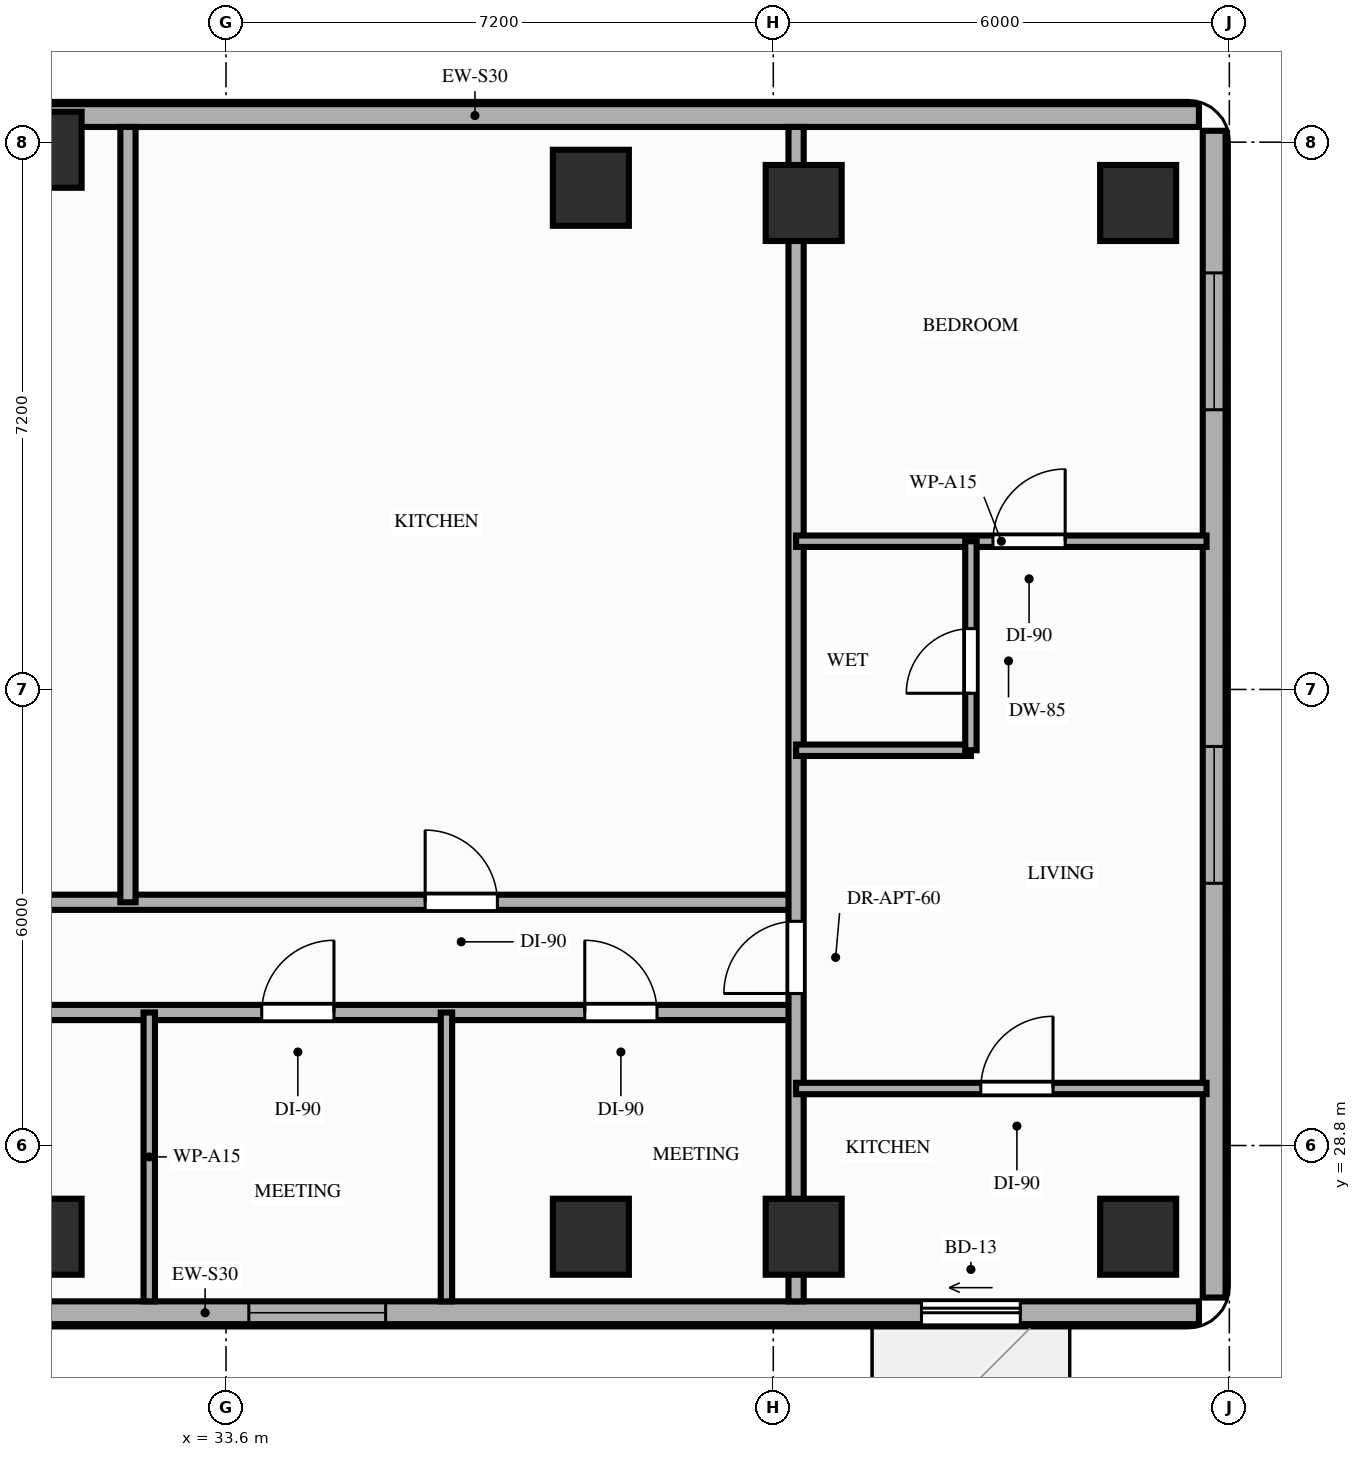
"""IFC4 building model, lengths in metres.
Left out: names, types, materials, properties, quantities, classifications, styles, units other than length and angle.
Written with IfcOpenShell. Run it as: python <this file> out.ifc"""

import sys

from ifc_helpers import new_model, si_unit, direction, frame, frame_2d, origin, origin_2d, place, context, subcontext, project, spatial, rectangle, extrude, element, fill, save


model = new_model("IFC4")
c1 = context("Model", 3, precision=1e-05, world=origin(), true_north=direction((0.0, 1.0)))
c2 = subcontext(c1, "Body", "Model", "MODEL_VIEW")
j1 = project(units=[si_unit("LENGTHUNIT", "METRE"), si_unit("PLANEANGLEUNIT", "RADIAN")], contexts=[c1])
p1 = place(None, origin())
s1 = spatial("IfcSite", under=j1, at=p1, CompositionType="ELEMENT")
p2 = place(p1, origin())
s2 = spatial("IfcBuilding", under=s1, at=p2, CompositionType="ELEMENT")
p3 = place(p2, frame((0.0, 0.0, 149.0)))
s3 = spatial("IfcBuildingStorey", under=s2, at=p3, CompositionType="ELEMENT", Elevation=149.0)
for number, where, z_axis, x_axis in (
    (1, (31.2, 27.6, 0.0), (0.0, 0.0, 1.0), (1.0, 0.0, 0.0)),
    (2, (31.2, 41.9, 0.0), (0.0, 0.0, 1.0), (1.0, 0.0, 0.0)),
    (3, (38.4, 27.6, 0.0), (0.0, 0.0, 1.0), (1.0, 0.0, 0.0)),
    (4, (38.4, 41.4, 0.0), (0.0, 0.0, 1.0), (1.0, 0.0, 0.0)),
    (5, (41.2, 27.6, 0.0), (0.0, 0.0, 1.0), (1.0, 0.0, 0.0)),
    (6, (41.2, 41.2, 0.0), (0.0, 0.0, 1.0), (1.0, 0.0, 0.0)),
    (7, (45.6, 27.6, 0.0), (0.0, 0.0, 1.0), (1.0, 0.0, 0.0)),
    (8, (45.6, 41.2, 0.0), (0.0, 0.0, 1.0), (1.0, 0.0, 0.0)),
):
    element("IfcColumn", number, at=place(p3, frame(where, z_axis=z_axis, x_axis=x_axis)), inside=s3, PredefinedType="COLUMN", context=c2, shape_type="SweptSolid", body=[
        extrude(rectangle(XDim=1.0, YDim=1.0, at=origin_2d()), origin(), (0.0, 0.0, 1.0), 3.2),
    ])
p4 = place(p3, frame((46.4, 42.35, 0.0), z_axis=(0.0, 0.0, 1.0), x_axis=(-1.0, 0.0, 0.0)))
e9 = element("IfcWall", 9, at=p4, inside=s3, PredefinedType="STANDARD", context=c2, shape_type="SweptSolid", body=[
    extrude(rectangle(XDim=19.05, YDim=0.3, at=frame_2d((9.525, 0.0))), origin(), (0.0, 0.0, 1.0), 2.4),
])
p5 = place(p3, frame((20.25, 26.6, 0.0), z_axis=(0.0, 0.0, 1.0), x_axis=(1.0, 0.0, 0.0)))
e10 = element("IfcWall", 10, at=p5, inside=s3, PredefinedType="STANDARD", context=c2, shape_type="SweptSolid", body=[
    extrude(rectangle(XDim=26.15, YDim=0.3, at=frame_2d((13.075, 0.0))), origin(), (0.0, 0.0, 1.0), 2.67),
])
p6 = place(p5, frame((8.0, 0.0, 0.0)))
e11 = element("IfcOpeningElement", 11, at=p6, cuts=e10, PredefinedType="OPENING", context=c2, shape_type="SweptSolid", body=[
    extrude(rectangle(XDim=1.3, YDim=2.08, at=frame_2d((0.65, 1.04))), frame((0.0, 0.16, 0.0), z_axis=(0.0, -1.0, 0.0), x_axis=(1.0, 0.0, 0.0)), (0.0, 0.0, 1.0), 0.32),
])
p7 = place(p5, frame((22.5, 0.0, 0.0)))
e12 = element("IfcOpeningElement", 12, at=p7, cuts=e10, PredefinedType="OPENING", context=c2, shape_type="SweptSolid", body=[
    extrude(rectangle(XDim=1.3, YDim=2.08, at=frame_2d((0.65, 1.04))), frame((0.0, 0.16, 0.0), z_axis=(0.0, -1.0, 0.0), x_axis=(1.0, 0.0, 0.0)), (0.0, 0.0, 1.0), 0.32),
])
p8 = place(p5, frame((2.25, 0.0, 0.85)))
e13 = element("IfcOpeningElement", 13, at=p8, cuts=e10, PredefinedType="OPENING", context=c2, shape_type="SweptSolid", body=[
    extrude(rectangle(XDim=1.8, YDim=1.57, at=frame_2d((0.9, 0.785))), frame((0.0, 0.16, 0.0), z_axis=(0.0, -1.0, 0.0), x_axis=(1.0, 0.0, 0.0)), (0.0, 0.0, 1.0), 0.32),
])
p9 = place(p5, frame((13.65, 0.0, 0.85)))
e14 = element("IfcOpeningElement", 14, at=p9, cuts=e10, PredefinedType="OPENING", context=c2, shape_type="SweptSolid", body=[
    extrude(rectangle(XDim=1.8, YDim=1.57, at=frame_2d((0.9, 0.785))), frame((0.0, 0.16, 0.0), z_axis=(0.0, -1.0, 0.0), x_axis=(1.0, 0.0, 0.0)), (0.0, 0.0, 1.0), 0.32),
])
p10 = place(p3, frame((46.6, 26.8, 0.0), z_axis=(0.0, 0.0, 1.0), x_axis=(0.0, 1.0, 0.0)))
e15 = element("IfcWall", 15, at=p10, inside=s3, PredefinedType="STANDARD", context=c2, shape_type="SweptSolid", body=[
    extrude(rectangle(XDim=15.35, YDim=0.3, at=frame_2d((7.675, 0.0))), origin(), (0.0, 0.0, 1.0), 2.96),
])
p11 = place(p10, frame((5.45, 0.0, 0.85)))
e16 = element("IfcOpeningElement", 16, at=p11, cuts=e15, PredefinedType="OPENING", context=c2, shape_type="SweptSolid", body=[
    extrude(rectangle(XDim=1.8, YDim=1.75, at=frame_2d((0.9, 0.875))), frame((0.0, 0.16, 0.0), z_axis=(0.0, -1.0, 0.0), x_axis=(1.0, 0.0, 0.0)), (0.0, 0.0, 1.0), 0.32),
])
p12 = place(p10, frame((11.68, 0.0, 0.85)))
e17 = element("IfcOpeningElement", 17, at=p12, cuts=e15, PredefinedType="OPENING", context=c2, shape_type="SweptSolid", body=[
    extrude(rectangle(XDim=1.8, YDim=1.75, at=frame_2d((0.9, 0.875))), frame((0.0, 0.16, 0.0), z_axis=(0.0, -1.0, 0.0), x_axis=(1.0, 0.0, 0.0)), (0.0, 0.0, 1.0), 0.32),
])
p13 = place(p3, frame((27.15, 30.55, 0.0), z_axis=(0.0, 0.0, 1.0), x_axis=(1.0, 0.0, 0.0)))
e18 = element("IfcWall", 18, at=p13, inside=s3, PredefinedType="PARTITIONING", context=c2, shape_type="SweptSolid", body=[
    extrude(rectangle(XDim=13.95, YDim=0.2, at=frame_2d((6.975, 0.0))), origin(), (0.0, 0.0, 1.0), 2.4),
])
p14 = place(p13, frame((2.24, 0.0, 0.0)))
e19 = element("IfcOpeningElement", 19, at=p14, cuts=e18, PredefinedType="OPENING", context=c2, shape_type="SweptSolid", body=[
    extrude(rectangle(XDim=0.95, YDim=2.15, at=frame_2d((0.475, 1.075))), frame((0.0, 0.11, 0.0), z_axis=(0.0, -1.0, 0.0), x_axis=(1.0, 0.0, 0.0)), (0.0, 0.0, 1.0), 0.22),
])
p15 = place(p13, frame((6.92, 0.0, 0.0)))
e20 = element("IfcOpeningElement", 20, at=p15, cuts=e18, PredefinedType="OPENING", context=c2, shape_type="SweptSolid", body=[
    extrude(rectangle(XDim=0.95, YDim=2.15, at=frame_2d((0.475, 1.075))), frame((0.0, 0.11, 0.0), z_axis=(0.0, -1.0, 0.0), x_axis=(1.0, 0.0, 0.0)), (0.0, 0.0, 1.0), 0.22),
])
p16 = place(p13, frame((11.17, 0.0, 0.0)))
e21 = element("IfcOpeningElement", 21, at=p16, cuts=e18, PredefinedType="OPENING", context=c2, shape_type="SweptSolid", body=[
    extrude(rectangle(XDim=0.95, YDim=2.15, at=frame_2d((0.475, 1.075))), frame((0.0, 0.11, 0.0), z_axis=(0.0, -1.0, 0.0), x_axis=(1.0, 0.0, 0.0)), (0.0, 0.0, 1.0), 0.22),
])
p17 = place(p3, frame((27.15, 32.0, 0.0), z_axis=(0.0, 0.0, 1.0), x_axis=(1.0, 0.0, 0.0)))
e22 = element("IfcWall", 22, at=p17, inside=s3, PredefinedType="PARTITIONING", context=c2, shape_type="SweptSolid", body=[
    extrude(rectangle(XDim=13.95, YDim=0.2, at=frame_2d((6.975, 0.0))), origin(), (0.0, 0.0, 1.0), 2.4),
])
p18 = place(p17, frame((2.1, 0.0, 0.0)))
e23 = element("IfcOpeningElement", 23, at=p18, cuts=e22, PredefinedType="OPENING", context=c2, shape_type="SweptSolid", body=[
    extrude(rectangle(XDim=0.95, YDim=2.15, at=frame_2d((0.475, 1.075))), frame((0.0, 0.11, 0.0), z_axis=(0.0, -1.0, 0.0), x_axis=(1.0, 0.0, 0.0)), (0.0, 0.0, 1.0), 0.22),
])
p19 = place(p17, frame((9.07, 0.0, 0.0)))
e24 = element("IfcOpeningElement", 24, at=p19, cuts=e22, PredefinedType="OPENING", context=c2, shape_type="SweptSolid", body=[
    extrude(rectangle(XDim=0.95, YDim=2.15, at=frame_2d((0.475, 1.075))), frame((0.0, 0.11, 0.0), z_axis=(0.0, -1.0, 0.0), x_axis=(1.0, 0.0, 0.0)), (0.0, 0.0, 1.0), 0.22),
])
p20 = place(p3, frame((41.1, 26.75, 0.0), z_axis=(0.0, 0.0, 1.0), x_axis=(0.0, 1.0, 0.0)))
e25 = element("IfcWall", 25, at=p20, inside=s3, PredefinedType="PARTITIONING", context=c2, shape_type="SweptSolid", body=[
    extrude(rectangle(XDim=15.45, YDim=0.2, at=frame_2d((7.725, 0.0))), origin(), (0.0, 0.0, 1.0), 2.4),
])
p21 = place(p20, frame((4.05, 0.0, 0.0)))
e26 = element("IfcOpeningElement", 26, at=p21, cuts=e25, PredefinedType="OPENING", context=c2, shape_type="SweptSolid", body=[
    extrude(rectangle(XDim=0.95, YDim=2.15, at=frame_2d((0.475, 1.075))), frame((0.0, 0.11, 0.0), z_axis=(0.0, -1.0, 0.0), x_axis=(1.0, 0.0, 0.0)), (0.0, 0.0, 1.0), 0.22),
])
p22 = place(p3, frame((41.1, 29.55, 0.0), z_axis=(0.0, 0.0, 1.0), x_axis=(1.0, 0.0, 0.0)))
e27 = element("IfcWall", 27, at=p22, inside=s3, PredefinedType="PARTITIONING", context=c2, shape_type="SweptSolid", body=[
    extrude(rectangle(XDim=5.4, YDim=0.15, at=frame_2d((2.7, 0.0))), origin(), (0.0, 0.0, 1.0), 2.4),
])
p23 = place(p22, frame((2.43, 0.0, 0.0)))
e28 = element("IfcOpeningElement", 28, at=p23, cuts=e27, PredefinedType="OPENING", context=c2, shape_type="SweptSolid", body=[
    extrude(rectangle(XDim=0.95, YDim=2.15, at=frame_2d((0.475, 1.075))), frame((0.0, 0.085, 0.0), z_axis=(0.0, -1.0, 0.0), x_axis=(1.0, 0.0, 0.0)), (0.0, 0.0, 1.0), 0.17),
])
p24 = place(p3, frame((41.1, 36.75, 0.0), z_axis=(0.0, 0.0, 1.0), x_axis=(1.0, 0.0, 0.0)))
e29 = element("IfcWall", 29, at=p24, inside=s3, PredefinedType="PARTITIONING", context=c2, shape_type="SweptSolid", body=[
    extrude(rectangle(XDim=5.4, YDim=0.15, at=frame_2d((2.7, 0.0))), origin(), (0.0, 0.0, 1.0), 2.4),
])
p25 = place(p24, frame((2.59, 0.0, 0.0)))
e30 = element("IfcOpeningElement", 30, at=p25, cuts=e29, PredefinedType="OPENING", context=c2, shape_type="SweptSolid", body=[
    extrude(rectangle(XDim=0.95, YDim=2.15, at=frame_2d((0.475, 1.075))), frame((0.0, 0.085, 0.0), z_axis=(0.0, -1.0, 0.0), x_axis=(1.0, 0.0, 0.0)), (0.0, 0.0, 1.0), 0.17),
])
p26 = place(p3, frame((41.1, 34.0, 0.0), z_axis=(0.0, 0.0, 1.0), x_axis=(1.0, 0.0, 0.0)))
e31 = element("IfcWall", 31, at=p26, inside=s3, PredefinedType="PARTITIONING", context=c2, shape_type="SweptSolid", body=[
    extrude(rectangle(XDim=2.3, YDim=0.15, at=frame_2d((1.15, 0.0))), origin(), (0.0, 0.0, 1.0), 2.4),
])
p27 = place(p3, frame((43.4, 34.0, 0.0), z_axis=(0.0, 0.0, 1.0), x_axis=(0.0, 1.0, 0.0)))
e32 = element("IfcWall", 32, at=p27, inside=s3, PredefinedType="PARTITIONING", context=c2, shape_type="SweptSolid", body=[
    extrude(rectangle(XDim=2.75, YDim=0.15, at=frame_2d((1.375, 0.0))), origin(), (0.0, 0.0, 1.0), 2.55),
])
p28 = place(p27, frame((0.75, 0.0, 0.0)))
e33 = element("IfcOpeningElement", 33, at=p28, cuts=e32, PredefinedType="OPENING", context=c2, shape_type="SweptSolid", body=[
    extrude(rectangle(XDim=0.85, YDim=2.1, at=frame_2d((0.425, 1.05))), frame((0.0, 0.085, 0.0), z_axis=(0.0, -1.0, 0.0), x_axis=(1.0, 0.0, 0.0)), (0.0, 0.0, 1.0), 0.17),
])
for number, where, z_axis, x_axis in (
    (34, (32.59, 26.75, 0.0), (0.0, 0.0, 1.0), (0.0, 1.0, 0.0)),
    (35, (36.5, 26.75, 0.0), (0.0, 0.0, 1.0), (0.0, 1.0, 0.0)),
):
    element("IfcWall", number, at=place(p3, frame(where, z_axis=z_axis, x_axis=x_axis)), inside=s3, PredefinedType="PARTITIONING", context=c2, shape_type="SweptSolid", body=[
        extrude(rectangle(XDim=3.8, YDim=0.15, at=frame_2d((1.9, 0.0))), origin(), (0.0, 0.0, 1.0), 2.4),
    ])
p29 = place(p3, frame((32.31, 32.0, 0.0), z_axis=(0.0, 0.0, 1.0), x_axis=(0.0, 1.0, 0.0)))
e36 = element("IfcWall", 36, at=p29, inside=s3, PredefinedType="PARTITIONING", context=c2, shape_type="SweptSolid", body=[
    extrude(rectangle(XDim=10.2, YDim=0.2, at=frame_2d((5.1, 0.0))), origin(), (0.0, 0.0, 1.0), 2.4),
])
p30 = place(p7, origin())
e37 = element("IfcDoor", 37, at=p30, inside=s3, OperationType="SLIDING_TO_LEFT", PredefinedType="DOOR", context=c2, shape_type="SweptSolid", body=[
    extrude(rectangle(XDim=1.3, YDim=2.08, at=frame_2d((0.65, 1.04))), frame((0.0, 0.025, 0.0), z_axis=(0.0, -1.0, 0.0), x_axis=(1.0, 0.0, 0.0)), (0.0, 0.0, 1.0), 0.05),
])
fill(e12, e37)
p31 = place(p11, origin())
e38 = element("IfcWindow", 38, at=p31, inside=s3, PartitioningType="SINGLE_PANEL", PredefinedType="WINDOW", context=c2, shape_type="SweptSolid", body=[
    extrude(rectangle(XDim=1.8, YDim=1.75, at=frame_2d((0.9, 0.875))), frame((0.0, 0.03, 0.0), z_axis=(0.0, -1.0, 0.0), x_axis=(1.0, 0.0, 0.0)), (0.0, 0.0, 1.0), 0.06),
])
fill(e16, e38)
p32 = place(p12, origin())
e39 = element("IfcWindow", 39, at=p32, inside=s3, PartitioningType="SINGLE_PANEL", PredefinedType="WINDOW", context=c2, shape_type="SweptSolid", body=[
    extrude(rectangle(XDim=1.8, YDim=1.75, at=frame_2d((0.9, 0.875))), frame((0.0, 0.03, 0.0), z_axis=(0.0, -1.0, 0.0), x_axis=(1.0, 0.0, 0.0)), (0.0, 0.0, 1.0), 0.06),
])
fill(e17, e39)
p33 = place(p9, origin())
e40 = element("IfcWindow", 40, at=p33, inside=s3, PartitioningType="SINGLE_PANEL", PredefinedType="WINDOW", context=c2, shape_type="SweptSolid", body=[
    extrude(rectangle(XDim=1.8, YDim=1.57, at=frame_2d((0.9, 0.785))), frame((0.0, 0.03, 0.0), z_axis=(0.0, -1.0, 0.0), x_axis=(1.0, 0.0, 0.0)), (0.0, 0.0, 1.0), 0.06),
])
fill(e14, e40)
p34 = place(p21, origin())
e41 = element("IfcDoor", 41, at=p34, inside=s3, OperationType="SINGLE_SWING_LEFT", PredefinedType="DOOR", context=c2, shape_type="SweptSolid", body=[
    extrude(rectangle(XDim=0.95, YDim=2.15, at=frame_2d((0.475, 1.075))), frame((0.0, 0.025, 0.0), z_axis=(0.0, -1.0, 0.0), x_axis=(1.0, 0.0, 0.0)), (0.0, 0.0, 1.0), 0.05),
])
fill(e26, e41)
p35 = place(p25, origin())
e42 = element("IfcDoor", 42, at=p35, inside=s3, OperationType="SINGLE_SWING_RIGHT", PredefinedType="DOOR", context=c2, shape_type="SweptSolid", body=[
    extrude(rectangle(XDim=0.95, YDim=2.15, at=frame_2d((0.475, 1.075))), frame((0.0, 0.025, 0.0), z_axis=(0.0, -1.0, 0.0), x_axis=(1.0, 0.0, 0.0)), (0.0, 0.0, 1.0), 0.05),
])
fill(e30, e42)
p36 = place(p28, origin())
e43 = element("IfcDoor", 43, at=p36, inside=s3, OperationType="SINGLE_SWING_LEFT", PredefinedType="DOOR", context=c2, shape_type="SweptSolid", body=[
    extrude(rectangle(XDim=0.85, YDim=2.1, at=frame_2d((0.425, 1.05))), frame((0.0, 0.025, 0.0), z_axis=(0.0, -1.0, 0.0), x_axis=(1.0, 0.0, 0.0)), (0.0, 0.0, 1.0), 0.05),
])
fill(e33, e43)
p37 = place(p23, origin())
e44 = element("IfcDoor", 44, at=p37, inside=s3, OperationType="SINGLE_SWING_RIGHT", PredefinedType="DOOR", context=c2, shape_type="SweptSolid", body=[
    extrude(rectangle(XDim=0.95, YDim=2.15, at=frame_2d((0.475, 1.075))), frame((0.0, 0.025, 0.0), z_axis=(0.0, -1.0, 0.0), x_axis=(1.0, 0.0, 0.0)), (0.0, 0.0, 1.0), 0.05),
])
fill(e28, e44)
p38 = place(p15, origin())
e45 = element("IfcDoor", 45, at=p38, inside=s3, OperationType="SINGLE_SWING_RIGHT", PredefinedType="DOOR", context=c2, shape_type="SweptSolid", body=[
    extrude(rectangle(XDim=0.95, YDim=2.15, at=frame_2d((0.475, 1.075))), frame((0.0, 0.025, 0.0), z_axis=(0.0, -1.0, 0.0), x_axis=(1.0, 0.0, 0.0)), (0.0, 0.0, 1.0), 0.05),
])
fill(e20, e45)
p39 = place(p16, origin())
e46 = element("IfcDoor", 46, at=p39, inside=s3, OperationType="SINGLE_SWING_LEFT", PredefinedType="DOOR", context=c2, shape_type="SweptSolid", body=[
    extrude(rectangle(XDim=0.95, YDim=2.15, at=frame_2d((0.475, 1.075))), frame((0.0, 0.025, 0.0), z_axis=(0.0, -1.0, 0.0), x_axis=(1.0, 0.0, 0.0)), (0.0, 0.0, 1.0), 0.05),
])
fill(e21, e46)
p40 = place(p19, origin())
e47 = element("IfcDoor", 47, at=p40, inside=s3, OperationType="SINGLE_SWING_LEFT", PredefinedType="DOOR", context=c2, shape_type="SweptSolid", body=[
    extrude(rectangle(XDim=0.95, YDim=2.15, at=frame_2d((0.475, 1.075))), frame((0.0, 0.025, 0.0), z_axis=(0.0, -1.0, 0.0), x_axis=(1.0, 0.0, 0.0)), (0.0, 0.0, 1.0), 0.05),
])
fill(e24, e47)
save(model, sys.argv[1])
